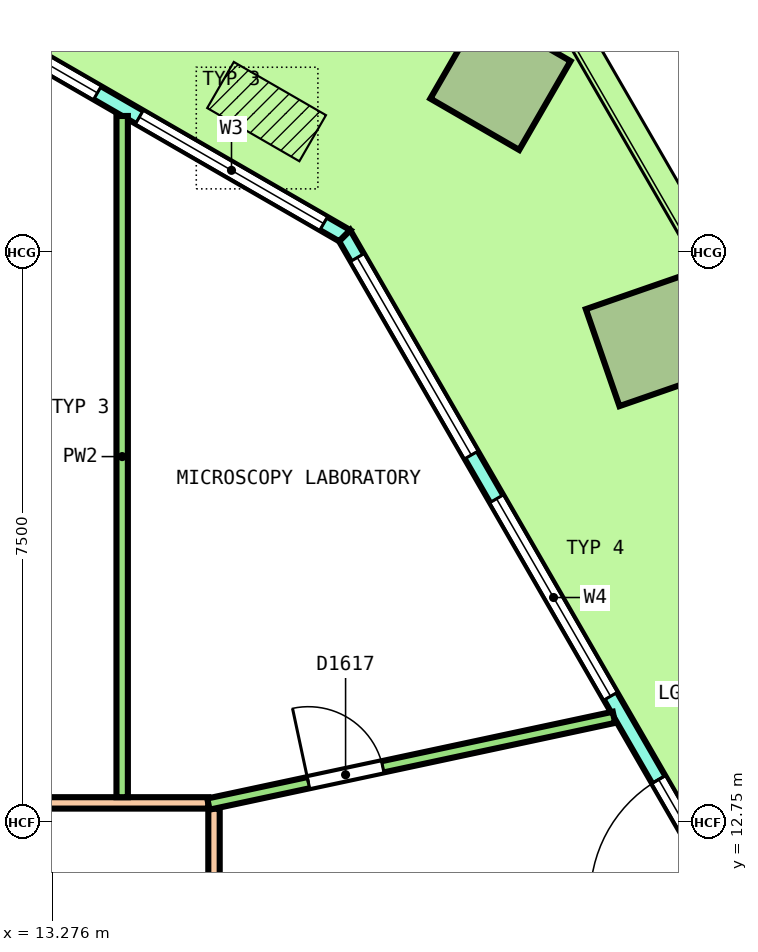
"""IFC4 building model, lengths in metres.
Left out: names, types, materials, properties, quantities, classifications, styles, units other than length and angle.
Written with IfcOpenShell. Run it as: python <this file> out.ifc"""

import sys

from ifc_helpers import new_model, si_unit, direction, frame, frame_2d, origin, origin_2d, place, context, subcontext, project, spatial, polyline, rectangle, outline, extrude, element, fill, save


model = new_model("IFC4")
c1 = context("Model", 3, precision=1e-05, world=origin(), true_north=direction((0.0, 1.0)))
c2 = subcontext(c1, "Body", "Model", "MODEL_VIEW")
j1 = project(units=[si_unit("LENGTHUNIT", "METRE"), si_unit("PLANEANGLEUNIT", "RADIAN")], contexts=[c1])
p1 = place(None, origin())
s1 = spatial("IfcSite", under=j1, at=p1, CompositionType="ELEMENT")
p2 = place(p1, origin())
s2 = spatial("IfcBuilding", under=s1, at=p2, CompositionType="ELEMENT")
p3 = place(p2, frame((0.0, 0.0, 117.6)))
s3 = spatial("IfcBuildingStorey", under=s2, at=p3, CompositionType="ELEMENT", Elevation=117.6)
p4 = place(p3, frame((21.151, 19.079, 0.0), z_axis=(0.032656153574, 0.006266125409, 0.99944700275), x_axis=(-0.499519802521, 0.866234012369, 0.010890486839)))
e1 = element("IfcColumn", 1, at=p4, inside=s3, PredefinedType="COLUMN", context=c2, shape_type="SweptSolid", body=[
    extrude(rectangle(XDim=1.35, YDim=1.35, at=origin_2d()), origin(), (0.0, 0.0, 1.0), 4.052),
])
p5 = place(p3, frame((19.168, 22.512, 0.0), z_axis=(0.036267419622, 0.0, 0.999342120734), x_axis=(-0.865313477853, 0.500246354177, 0.031403346616)))
e2 = element("IfcColumn", 2, at=p5, inside=s3, PredefinedType="COLUMN", context=c2, shape_type="SweptSolid", body=[
    extrude(rectangle(XDim=1.35, YDim=1.35, at=origin_2d()), origin(), (0.0, 0.0, 1.0), 4.052),
])
p6 = place(p3, frame((26.281, 4.594, 0.0), z_axis=(0.0, 0.0, 1.0), x_axis=(-0.499998099904, 0.866026500803, 0.0)))
e3 = element("IfcWall", 3, at=p6, inside=s3, PredefinedType="SOLIDWALL", context=c2, shape_type="SweptSolid", body=[
    extrude(outline(polyline([(-0.027, -0.1), (0.994, -0.1), (2.015, -0.1), (3.036, -0.1), (4.057, -0.1), (5.078, -0.1), (6.099, -0.1), (7.12, -0.1), (8.141, -0.1), (9.162, -0.1), (10.183, -0.1), (11.204, -0.1), (12.225, -0.1), (13.246, -0.1), (14.267, -0.1), (15.288, -0.1), (16.309, -0.1), (17.33, -0.1), (18.351, -0.1), (18.297, 0.1), (17.282, 0.1), (16.267, 0.1), (15.252, 0.1), (14.237, 0.1), (13.222, 0.1), (12.207, 0.1), (11.192, 0.1), (10.177, 0.1), (9.162, 0.1), (8.147, 0.1), (7.132, 0.1), (6.117, 0.1), (5.102, 0.1), (4.087, 0.1), (3.072, 0.1), (2.057, 0.1), (1.042, 0.1), (0.027, 0.1), (-0.027, -0.1)])), origin(), (0.0, 0.0, 1.0), 4.1),
])
p7 = place(p6, frame((0.333, 0.0, 0.1)))
e4 = element("IfcOpeningElement", 4, at=p7, cuts=e3, PredefinedType="OPENING", context=c2, shape_type="SweptSolid", body=[
    extrude(rectangle(XDim=3.0, YDim=2.9, at=frame_2d((1.5, 1.45))), frame((0.0, 0.11, 0.0), z_axis=(0.0, -1.0, 0.0), x_axis=(1.0, 0.0, 0.0)), (0.0, 0.0, 1.0), 0.22),
])
p8 = place(p6, frame((3.997, 0.0, 0.1)))
e5 = element("IfcOpeningElement", 5, at=p8, cuts=e3, PredefinedType="OPENING", context=c2, shape_type="SweptSolid", body=[
    extrude(rectangle(XDim=3.0, YDim=2.9, at=frame_2d((1.5, 1.45))), frame((0.0, 0.11, 0.0), z_axis=(0.0, -1.0, 0.0), x_axis=(1.0, 0.0, 0.0)), (0.0, 0.0, 1.0), 0.22),
])
p9 = place(p6, frame((8.262, 0.0, 0.0)))
e6 = element("IfcOpeningElement", 6, at=p9, cuts=e3, PredefinedType="OPENING", context=c2, shape_type="SweptSolid", body=[
    extrude(rectangle(XDim=1.8, YDim=2.4, at=frame_2d((0.9, 1.2))), frame((0.0, 0.11, 0.0), z_axis=(0.0, -1.0, 0.0), x_axis=(1.0, 0.0, 0.0)), (0.0, 0.0, 1.0), 0.22),
])
p10 = place(p6, frame((8.262, 0.0, 2.55)))
e7 = element("IfcOpeningElement", 7, at=p10, cuts=e3, PredefinedType="OPENING", context=c2, shape_type="SweptSolid", body=[
    extrude(rectangle(XDim=1.8, YDim=0.45, at=frame_2d((0.9, 0.225))), frame((0.0, 0.11, 0.0), z_axis=(0.0, -1.0, 0.0), x_axis=(1.0, 0.0, 0.0)), (0.0, 0.0, 1.0), 0.22),
])
p11 = place(p6, frame((11.327, 0.0, 0.1)))
e8 = element("IfcOpeningElement", 8, at=p11, cuts=e3, PredefinedType="OPENING", context=c2, shape_type="SweptSolid", body=[
    extrude(rectangle(XDim=3.0, YDim=2.9, at=frame_2d((1.5, 1.45))), frame((0.0, 0.11, 0.0), z_axis=(0.0, -1.0, 0.0), x_axis=(1.0, 0.0, 0.0)), (0.0, 0.0, 1.0), 0.22),
])
p12 = place(p6, frame((14.991, 0.0, 0.1)))
e9 = element("IfcOpeningElement", 9, at=p12, cuts=e3, PredefinedType="OPENING", context=c2, shape_type="SweptSolid", body=[
    extrude(rectangle(XDim=3.0, YDim=2.9, at=frame_2d((1.5, 1.45))), frame((0.0, 0.11, 0.0), z_axis=(0.0, -1.0, 0.0), x_axis=(1.0, 0.0, 0.0)), (0.0, 0.0, 1.0), 0.22),
])
p13 = place(p3, frame((17.119, 20.463, 0.0), z_axis=(0.0, 0.0, 1.0), x_axis=(-0.866029458321, 0.49999297727, 0.0)))
e10 = element("IfcWall", 10, at=p13, inside=s3, PredefinedType="SOLIDWALL", context=c2, shape_type="SweptSolid", body=[
    extrude(outline(polyline([(-0.027, -0.1), (1.128, -0.1), (2.282, -0.1), (3.437, -0.1), (4.592, -0.1), (5.747, -0.1), (6.901, -0.1), (6.848, 0.1), (5.711, 0.1), (4.574, 0.1), (3.437, 0.1), (2.301, 0.1), (1.164, 0.1), (0.027, 0.1), (-0.027, -0.1)])), origin(), (0.0, 0.0, 1.0), 4.1),
])
p14 = place(p13, frame((0.319, 0.0, 0.1)))
e11 = element("IfcOpeningElement", 11, at=p14, cuts=e10, PredefinedType="OPENING", context=c2, shape_type="SweptSolid", body=[
    extrude(rectangle(XDim=2.8, YDim=2.9, at=frame_2d((1.4, 1.45))), frame((0.0, 0.11, 0.0), z_axis=(0.0, -1.0, 0.0), x_axis=(1.0, 0.0, 0.0)), (0.0, 0.0, 1.0), 0.22),
])
p15 = place(p13, frame((3.756, 0.0, 0.1)))
e12 = element("IfcOpeningElement", 12, at=p15, cuts=e10, PredefinedType="OPENING", context=c2, shape_type="SweptSolid", body=[
    extrude(rectangle(XDim=2.8, YDim=2.9, at=frame_2d((1.4, 1.45))), frame((0.0, 0.11, 0.0), z_axis=(0.0, -1.0, 0.0), x_axis=(1.0, 0.0, 0.0)), (0.0, 0.0, 1.0), 0.22),
])
p16 = place(p3, frame((15.4, 0.349, 0.0), z_axis=(0.0, 0.0, 1.0), x_axis=(0.0, 1.0, 0.0)))
e13 = element("IfcWall", 13, at=p16, inside=s3, PredefinedType="PARTITIONING", context=c2, shape_type="SweptSolid", body=[
    extrude(rectangle(XDim=12.576, YDim=0.15, at=frame_2d((6.288, 0.0))), origin(), (0.0, 0.0, 1.0), 3.05),
])
p17 = place(p16, frame((9.631, 0.0, 0.0)))
e14 = element("IfcOpeningElement", 14, at=p17, cuts=e13, PredefinedType="OPENING", context=c2, shape_type="SweptSolid", body=[
    extrude(rectangle(XDim=1.0, YDim=2.1, at=frame_2d((0.5, 1.05))), frame((0.0, 0.085, 0.0), z_axis=(0.0, -1.0, 0.0), x_axis=(1.0, 0.0, 0.0)), (0.0, 0.0, 1.0), 0.17),
])
p18 = place(p3, frame((-15.325, 13.0, 0.0), z_axis=(0.0, 0.0, 1.0), x_axis=(1.0, 0.0, 0.0)))
e15 = element("IfcWall", 15, at=p18, inside=s3, PredefinedType="PARTITIONING", context=c2, shape_type="SweptSolid", body=[
    extrude(rectangle(XDim=30.65, YDim=0.15, at=frame_2d((15.325, 0.0))), origin(), (0.0, 0.0, 1.0), 3.05),
])
p19 = place(p18, frame((24.412, 0.0, 0.0)))
e16 = element("IfcOpeningElement", 16, at=p19, cuts=e15, PredefinedType="OPENING", context=c2, shape_type="SweptSolid", body=[
    extrude(rectangle(XDim=1.0, YDim=2.1, at=frame_2d((0.5, 1.05))), frame((0.0, 0.085, 0.0), z_axis=(0.0, -1.0, 0.0), x_axis=(1.0, 0.0, 0.0)), (0.0, 0.0, 1.0), 0.17),
])
p20 = place(p18, frame((12.996, 0.0, 0.0)))
e17 = element("IfcOpeningElement", 17, at=p20, cuts=e15, PredefinedType="OPENING", context=c2, shape_type="SweptSolid", body=[
    extrude(rectangle(XDim=1.2, YDim=2.1, at=frame_2d((0.6, 1.05))), frame((0.0, 0.085, 0.0), z_axis=(0.0, -1.0, 0.0), x_axis=(1.0, 0.0, 0.0)), (0.0, 0.0, 1.0), 0.17),
])
p21 = place(p18, frame((3.435, 0.0, 0.0)))
e18 = element("IfcOpeningElement", 18, at=p21, cuts=e15, PredefinedType="OPENING", context=c2, shape_type="SweptSolid", body=[
    extrude(rectangle(XDim=1.2, YDim=2.1, at=frame_2d((0.6, 1.05))), frame((0.0, 0.085, 0.0), z_axis=(0.0, -1.0, 0.0), x_axis=(1.0, 0.0, 0.0)), (0.0, 0.0, 1.0), 0.17),
])
p22 = place(p3, frame((15.327, 12.984, 0.0), z_axis=(0.0, 0.0, 1.0), x_axis=(0.977871777119, 0.209205132621, 0.0)))
e19 = element("IfcWall", 19, at=p22, inside=s3, PredefinedType="PARTITIONING", context=c2, shape_type="SweptSolid", body=[
    extrude(rectangle(XDim=5.456, YDim=0.15, at=frame_2d((2.728, 0.0))), origin(), (0.0, 0.0, 1.0), 3.05),
])
p23 = place(p22, frame((1.345, 0.0, 0.0)))
e20 = element("IfcOpeningElement", 20, at=p23, cuts=e19, PredefinedType="OPENING", context=c2, shape_type="SweptSolid", body=[
    extrude(rectangle(XDim=1.0, YDim=2.1, at=frame_2d((0.5, 1.05))), frame((0.0, 0.085, 0.0), z_axis=(0.0, -1.0, 0.0), x_axis=(1.0, 0.0, 0.0)), (0.0, 0.0, 1.0), 0.17),
])
p24 = place(p3, frame((14.192, 13.075, 0.0), z_axis=(0.0, 0.0, 1.0), x_axis=(0.0, 1.0, 0.0)))
e21 = element("IfcWall", 21, at=p24, inside=s3, PredefinedType="PARTITIONING", context=c2, shape_type="SweptSolid", body=[
    extrude(rectangle(XDim=8.962, YDim=0.15, at=frame_2d((4.481, 0.0))), origin(), (0.0, 0.0, 1.0), 3.05),
])
p25 = place(p9, origin())
e22 = element("IfcDoor", 22, at=p25, inside=s3, OperationType="DOUBLE_DOOR_SINGLE_SWING", PredefinedType="DOOR", context=c2, shape_type="SweptSolid", body=[
    extrude(rectangle(XDim=1.8, YDim=2.4, at=frame_2d((0.9, 1.2))), frame((0.0, 0.025, 0.0), z_axis=(0.0, -1.0, 0.0), x_axis=(1.0, 0.0, 0.0)), (0.0, 0.0, 1.0), 0.05),
])
fill(e6, e22)
p26 = place(p10, origin())
e23 = element("IfcWindow", 23, at=p26, inside=s3, PartitioningType="SINGLE_PANEL", PredefinedType="WINDOW", context=c2, shape_type="SweptSolid", body=[
    extrude(rectangle(XDim=1.8, YDim=0.45, at=frame_2d((0.9, 0.225))), frame((0.0, 0.03, 0.0), z_axis=(0.0, -1.0, 0.0), x_axis=(1.0, 0.0, 0.0)), (0.0, 0.0, 1.0), 0.06),
])
fill(e7, e23)
p27 = place(p11, origin())
e24 = element("IfcWindow", 24, at=p27, inside=s3, PartitioningType="SINGLE_PANEL", PredefinedType="WINDOW", context=c2, shape_type="SweptSolid", body=[
    extrude(rectangle(XDim=3.0, YDim=2.9, at=frame_2d((1.5, 1.45))), frame((0.0, 0.03, 0.0), z_axis=(0.0, -1.0, 0.0), x_axis=(1.0, 0.0, 0.0)), (0.0, 0.0, 1.0), 0.06),
])
fill(e8, e24)
p28 = place(p12, origin())
e25 = element("IfcWindow", 25, at=p28, inside=s3, PartitioningType="SINGLE_PANEL", PredefinedType="WINDOW", context=c2, shape_type="SweptSolid", body=[
    extrude(rectangle(XDim=3.0, YDim=2.9, at=frame_2d((1.5, 1.45))), frame((0.0, 0.03, 0.0), z_axis=(0.0, -1.0, 0.0), x_axis=(1.0, 0.0, 0.0)), (0.0, 0.0, 1.0), 0.06),
])
fill(e9, e25)
p29 = place(p14, origin())
e26 = element("IfcWindow", 26, at=p29, inside=s3, PartitioningType="SINGLE_PANEL", PredefinedType="WINDOW", context=c2, shape_type="SweptSolid", body=[
    extrude(rectangle(XDim=2.8, YDim=2.9, at=frame_2d((1.4, 1.45))), frame((0.0, 0.03, 0.0), z_axis=(0.0, -1.0, 0.0), x_axis=(1.0, 0.0, 0.0)), (0.0, 0.0, 1.0), 0.06),
])
fill(e11, e26)
p30 = place(p15, origin())
e27 = element("IfcWindow", 27, at=p30, inside=s3, PartitioningType="SINGLE_PANEL", PredefinedType="WINDOW", context=c2, shape_type="SweptSolid", body=[
    extrude(rectangle(XDim=2.8, YDim=2.9, at=frame_2d((1.4, 1.45))), frame((0.0, 0.03, 0.0), z_axis=(0.0, -1.0, 0.0), x_axis=(1.0, 0.0, 0.0)), (0.0, 0.0, 1.0), 0.06),
])
fill(e12, e27)
p31 = place(p23, origin())
e28 = element("IfcDoor", 28, at=p31, inside=s3, OperationType="SINGLE_SWING_RIGHT", PredefinedType="DOOR", context=c2, shape_type="SweptSolid", body=[
    extrude(rectangle(XDim=1.0, YDim=2.1, at=frame_2d((0.5, 1.05))), frame((0.0, 0.025, 0.0), z_axis=(0.0, -1.0, 0.0), x_axis=(1.0, 0.0, 0.0)), (0.0, 0.0, 1.0), 0.05),
])
fill(e20, e28)
save(model, sys.argv[1])
